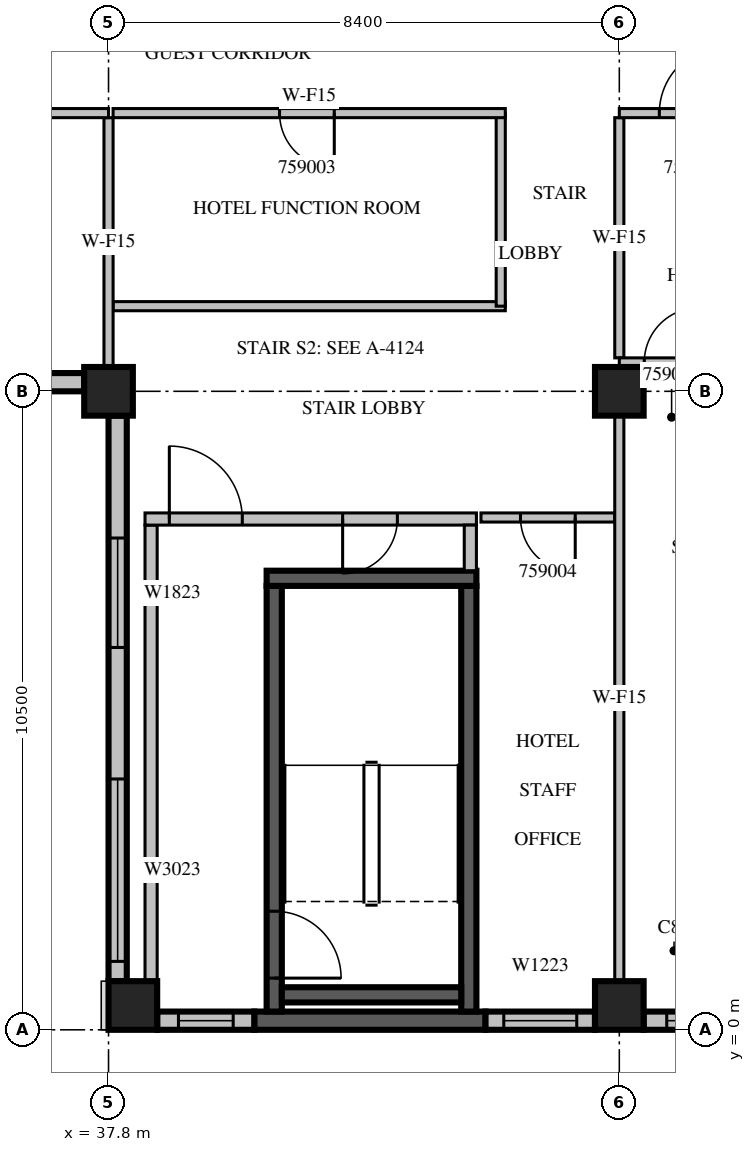
"""IFC4 building model, lengths in metres.
Left out: names, types, materials, properties, quantities, classifications, styles, units other than length and angle.
Written with IfcOpenShell. Run it as: python <this file> out.ifc"""

import sys

from ifc_helpers import new_model, si_unit, direction, frame, frame_2d, origin, origin_2d, place, context, subcontext, project, spatial, rectangle, extrude, source, transform, mapped, element, fill, save


model = new_model("IFC4")
c1 = context("Model", 3, precision=1e-05, world=origin(), true_north=direction((0.0, 1.0)))
c2 = subcontext(c1, "Body", "Model", "MODEL_VIEW")
j1 = project(units=[si_unit("LENGTHUNIT", "METRE"), si_unit("PLANEANGLEUNIT", "RADIAN")], contexts=[c1])
p1 = place(None, origin())
s1 = spatial("IfcSite", under=j1, at=p1, CompositionType="ELEMENT")
p2 = place(p1, origin())
s2 = spatial("IfcBuilding", under=s1, at=p2, CompositionType="ELEMENT")
p3 = place(p2, frame((0.0, 0.0, 257.6)))
s3 = spatial("IfcBuildingStorey", under=s2, at=p3, CompositionType="ELEMENT", Elevation=257.6)
m1 = source(origin(), c2, "Body", "SweptSolid", [
    extrude(rectangle(XDim=0.8, YDim=0.8, at=origin_2d()), origin(), (0.0, 0.0, 1.0), 3.8),
])
for number, where, z_axis, x_axis in (
    (1, (38.2, 0.4, 0.0), (0.0, 0.0, 1.0), (1.0, 0.0, 0.0)),
    (2, (46.2, 0.4, 0.0), (0.0, 0.0, 1.0), (1.0, 0.0, 0.0)),
    (3, (37.8, 10.5, 0.0), (0.0, 0.0, 1.0), (1.0, 0.0, 0.0)),
    (4, (46.2, 10.5, 0.0), (0.0, 0.0, 1.0), (1.0, 0.0, 0.0)),
):
    element("IfcColumn", number, at=place(p3, frame(where, z_axis=z_axis, x_axis=x_axis)), inside=s3, PredefinedType="COLUMN", context=c2, shape_type="MappedRepresentation", body=[
        mapped(m1, transform((0.0, 0.0, 0.0), scale=1.0)),
    ])
m2 = source(origin(), c2, "Body", "SweptSolid", [
    extrude(rectangle(XDim=7.6, YDim=0.3, at=frame_2d((3.8, 0.0))), origin(), (0.0, 0.0, 1.0), 3.4),
])
p4 = place(p3, frame((29.8, 10.65, 0.0), z_axis=(0.0, 0.0, 1.0), x_axis=(1.0, 0.0, 0.0)))
e5 = element("IfcWall", 5, at=p4, inside=s3, PredefinedType="STANDARD", context=c2, shape_type="MappedRepresentation", body=[
    mapped(m2, transform((0.0, 0.0, 0.0), scale=1.0)),
])
m3 = source(origin(), c2, "Body", "SweptSolid", [
    extrude(rectangle(XDim=3.0, YDim=2.3, at=frame_2d((1.5, 1.15))), frame((0.0, 0.16, 0.0), z_axis=(0.0, -1.0, 0.0), x_axis=(1.0, 0.0, 0.0)), (0.0, 0.0, 1.0), 0.32),
])
p5 = place(p4, frame((0.2, 0.0, 0.6)))
e6 = element("IfcOpeningElement", 6, at=p5, cuts=e5, PredefinedType="OPENING", context=c2, shape_type="MappedRepresentation", body=[
    mapped(m3, transform((0.0, 0.0, 0.0), scale=1.0)),
])
m4 = source(origin(), c2, "Body", "SweptSolid", [
    extrude(rectangle(XDim=9.3, YDim=0.3, at=frame_2d((4.65, 0.0))), origin(), (0.0, 0.0, 1.0), 3.4),
])
p6 = place(p3, frame((37.95, 10.1, 0.0), z_axis=(0.0, 0.0, 1.0), x_axis=(0.0, -1.0, 0.0)))
e7 = element("IfcWall", 7, at=p6, inside=s3, PredefinedType="STANDARD", context=c2, shape_type="MappedRepresentation", body=[
    mapped(m4, transform((0.0, 0.0, 0.0), scale=1.0)),
])
m5 = source(origin(), c2, "Body", "SweptSolid", [
    extrude(rectangle(XDim=1.8, YDim=2.3, at=frame_2d((0.9, 1.15))), frame((0.0, 0.16, 0.0), z_axis=(0.0, -1.0, 0.0), x_axis=(1.0, 0.0, 0.0)), (0.0, 0.0, 1.0), 0.32),
])
p7 = place(p6, frame((2.013, 0.0, 0.6)))
e8 = element("IfcOpeningElement", 8, at=p7, cuts=e7, PredefinedType="OPENING", context=c2, shape_type="MappedRepresentation", body=[
    mapped(m5, transform((0.0, 0.0, 0.0), scale=1.0)),
])
p8 = place(p6, frame((5.975, 0.0, 0.6)))
e9 = element("IfcOpeningElement", 9, at=p8, cuts=e7, PredefinedType="OPENING", context=c2, shape_type="MappedRepresentation", body=[
    mapped(m3, transform((0.0, 0.0, 0.0), scale=1.0)),
])
m6 = source(origin(), c2, "Body", "SweptSolid", [
    extrude(rectangle(XDim=1.6, YDim=0.3, at=frame_2d((0.8, 0.0))), origin(), (0.0, 0.0, 1.0), 3.4),
])
p9 = place(p3, frame((38.6, 0.15, 0.0), z_axis=(0.0, 0.0, 1.0), x_axis=(1.0, 0.0, 0.0)))
e10 = element("IfcWall", 10, at=p9, inside=s3, PredefinedType="STANDARD", context=c2, shape_type="MappedRepresentation", body=[
    mapped(m6, transform((0.0, 0.0, 0.0), scale=1.0)),
])
m7 = source(origin(), c2, "Body", "SweptSolid", [
    extrude(rectangle(XDim=0.9, YDim=2.3, at=frame_2d((0.45, 1.15))), frame((0.0, 0.16, 0.0), z_axis=(0.0, -1.0, 0.0), x_axis=(1.0, 0.0, 0.0)), (0.0, 0.0, 1.0), 0.32),
])
p10 = place(p9, frame((0.35, 0.0, 0.6)))
e11 = element("IfcOpeningElement", 11, at=p10, cuts=e10, PredefinedType="OPENING", context=c2, shape_type="MappedRepresentation", body=[
    mapped(m7, transform((0.0, 0.0, 0.0), scale=1.0)),
])
m8 = source(origin(), c2, "Body", "SweptSolid", [
    extrude(rectangle(XDim=3.8, YDim=0.3, at=frame_2d((1.9, 0.0))), origin(), (0.0, 0.0, 1.0), 3.4),
])
p11 = place(p3, frame((40.2, 0.15, 0.0), z_axis=(0.0, 0.0, 1.0), x_axis=(1.0, 0.0, 0.0)))
e12 = element("IfcWall", 12, at=p11, inside=s3, PredefinedType="SOLIDWALL", context=c2, shape_type="MappedRepresentation", body=[
    mapped(m8, transform((0.0, 0.0, 0.0), scale=1.0)),
])
m9 = source(origin(), c2, "Body", "SweptSolid", [
    extrude(rectangle(XDim=1.8, YDim=0.3, at=frame_2d((0.9, 0.0))), origin(), (0.0, 0.0, 1.0), 3.4),
])
p12 = place(p3, frame((44.0, 0.15, 0.0), z_axis=(0.0, 0.0, 1.0), x_axis=(1.0, 0.0, 0.0)))
e13 = element("IfcWall", 13, at=p12, inside=s3, PredefinedType="STANDARD", context=c2, shape_type="MappedRepresentation", body=[
    mapped(m9, transform((0.0, 0.0, 0.0), scale=1.0)),
])
m10 = source(origin(), c2, "Body", "SweptSolid", [
    extrude(rectangle(XDim=1.2, YDim=2.3, at=frame_2d((0.6, 1.15))), frame((0.0, 0.16, 0.0), z_axis=(0.0, -1.0, 0.0), x_axis=(1.0, 0.0, 0.0)), (0.0, 0.0, 1.0), 0.32),
])
p13 = place(p12, frame((0.3, 0.0, 0.6)))
e14 = element("IfcOpeningElement", 14, at=p13, cuts=e13, PredefinedType="OPENING", context=c2, shape_type="MappedRepresentation", body=[
    mapped(m10, transform((0.0, 0.0, 0.0), scale=1.0)),
])
m11 = source(origin(), c2, "Body", "SweptSolid", [
    extrude(rectangle(XDim=2.96, YDim=0.3, at=frame_2d((1.48, 0.0))), origin(), (0.0, 0.0, 1.0), 3.4),
])
p14 = place(p3, frame((46.6, 0.15, 0.0), z_axis=(0.0, 0.0, 1.0), x_axis=(1.0, 0.0, 0.0)))
e15 = element("IfcWall", 15, at=p14, inside=s3, PredefinedType="STANDARD", context=c2, shape_type="MappedRepresentation", body=[
    mapped(m11, transform((0.0, 0.0, 0.0), scale=1.0)),
])
p15 = place(p14, frame((0.38, 0.0, 0.6)))
e16 = element("IfcOpeningElement", 16, at=p15, cuts=e15, PredefinedType="OPENING", context=c2, shape_type="MappedRepresentation", body=[
    mapped(m5, transform((0.0, 0.0, 0.0), scale=1.0)),
])
m12 = source(origin(), c2, "Body", "SweptSolid", [
    extrude(rectangle(XDim=7.0, YDim=0.25, at=frame_2d((3.5, 0.0))), origin(), (0.0, 0.0, 1.0), 3.4),
])
p16 = place(p3, frame((40.525, 0.3, 0.0), z_axis=(0.0, 0.0, 1.0), x_axis=(0.0, 1.0, 0.0)))
e17 = element("IfcWall", 17, at=p16, inside=s3, PredefinedType="SOLIDWALL", context=c2, shape_type="MappedRepresentation", body=[
    mapped(m12, transform((0.0, 0.0, 0.0), scale=1.0)),
])
m13 = source(origin(), c2, "Body", "SweptSolid", [
    extrude(rectangle(XDim=1.1, YDim=2.1, at=frame_2d((0.55, 1.05))), frame((0.0, 0.135, 0.0), z_axis=(0.0, -1.0, 0.0), x_axis=(1.0, 0.0, 0.0)), (0.0, 0.0, 1.0), 0.27),
])
p17 = place(p16, frame((0.55, 0.0, 0.0)))
e18 = element("IfcOpeningElement", 18, at=p17, cuts=e17, PredefinedType="OPENING", context=c2, shape_type="MappedRepresentation", body=[
    mapped(m13, transform((0.0, 0.0, 0.0), scale=1.0)),
])
p18 = place(p3, frame((43.725, 0.3, 0.0), z_axis=(0.0, 0.0, 1.0), x_axis=(0.0, 1.0, 0.0)))
e19 = element("IfcWall", 19, at=p18, inside=s3, PredefinedType="SOLIDWALL", context=c2, shape_type="MappedRepresentation", body=[
    mapped(m12, transform((0.0, 0.0, 0.0), scale=1.0)),
])
m14 = source(origin(), c2, "Body", "SweptSolid", [
    extrude(rectangle(XDim=3.45, YDim=0.25, at=frame_2d((1.725, 0.0))), origin(), (0.0, 0.0, 1.0), 3.4),
])
p19 = place(p3, frame((40.4, 7.425, 0.0), z_axis=(0.0, 0.0, 1.0), x_axis=(1.0, 0.0, 0.0)))
e20 = element("IfcWall", 20, at=p19, inside=s3, PredefinedType="SOLIDWALL", context=c2, shape_type="MappedRepresentation", body=[
    mapped(m14, transform((0.0, 0.0, 0.0), scale=1.0)),
])
m15 = source(origin(), c2, "Body", "SweptSolid", [
    extrude(rectangle(XDim=2.95, YDim=0.25, at=frame_2d((1.475, 0.0))), origin(), (0.0, 0.0, 1.0), 3.4),
])
p20 = place(p3, frame((40.65, 0.575, 0.0), z_axis=(0.0, 0.0, 1.0), x_axis=(1.0, 0.0, 0.0)))
e21 = element("IfcWall", 21, at=p20, inside=s3, PredefinedType="SOLIDWALL", context=c2, shape_type="MappedRepresentation", body=[
    mapped(m15, transform((0.0, 0.0, 0.0), scale=1.0)),
])
m16 = source(origin(), c2, "Body", "SweptSolid", [
    extrude(rectangle(XDim=8.0, YDim=0.2, at=frame_2d((4.0, 0.0))), origin(), (0.0, 0.0, 1.0), 3.4),
])
p21 = place(p3, frame((38.5, 0.3, 0.0), z_axis=(0.0, 0.0, 1.0), x_axis=(0.0, 1.0, 0.0)))
e22 = element("IfcWall", 22, at=p21, inside=s3, PredefinedType="PARTITIONING", context=c2, shape_type="MappedRepresentation", body=[
    mapped(m16, transform((0.0, 0.0, 0.0), scale=1.0)),
])
m17 = source(origin(), c2, "Body", "SweptSolid", [
    extrude(rectangle(XDim=5.45, YDim=0.2, at=frame_2d((2.725, 0.0))), origin(), (0.0, 0.0, 1.0), 3.4),
])
p22 = place(p3, frame((38.4, 8.4, 0.0), z_axis=(0.0, 0.0, 1.0), x_axis=(1.0, 0.0, 0.0)))
e23 = element("IfcWall", 23, at=p22, inside=s3, PredefinedType="PARTITIONING", context=c2, shape_type="MappedRepresentation", body=[
    mapped(m17, transform((0.0, 0.0, 0.0), scale=1.0)),
])
m18 = source(origin(), c2, "Body", "SweptSolid", [
    extrude(rectangle(XDim=1.2, YDim=2.1, at=frame_2d((0.6, 1.05))), frame((0.0, 0.11, 0.0), z_axis=(0.0, -1.0, 0.0), x_axis=(1.0, 0.0, 0.0)), (0.0, 0.0, 1.0), 0.22),
])
p23 = place(p22, frame((0.4, 0.0, 0.0)))
e24 = element("IfcOpeningElement", 24, at=p23, cuts=e23, PredefinedType="OPENING", context=c2, shape_type="MappedRepresentation", body=[
    mapped(m18, transform((0.0, 0.0, 0.0), scale=1.0)),
])
m19 = source(origin(), c2, "Body", "SweptSolid", [
    extrude(rectangle(XDim=0.9, YDim=2.1, at=frame_2d((0.45, 1.05))), frame((0.0, 0.11, 0.0), z_axis=(0.0, -1.0, 0.0), x_axis=(1.0, 0.0, 0.0)), (0.0, 0.0, 1.0), 0.22),
])
p24 = place(p22, frame((3.25, 0.0, 0.0)))
e25 = element("IfcOpeningElement", 25, at=p24, cuts=e23, PredefinedType="OPENING", context=c2, shape_type="MappedRepresentation", body=[
    mapped(m19, transform((0.0, 0.0, 0.0), scale=1.0)),
])
m20 = source(origin(), c2, "Body", "SweptSolid", [
    extrude(rectangle(XDim=0.75, YDim=0.2, at=frame_2d((0.375, 0.0))), origin(), (0.0, 0.0, 1.0), 3.4),
])
p25 = place(p3, frame((43.75, 7.55, 0.0), z_axis=(0.0, 0.0, 1.0), x_axis=(0.0, 1.0, 0.0)))
e26 = element("IfcWall", 26, at=p25, inside=s3, PredefinedType="PARTITIONING", context=c2, shape_type="MappedRepresentation", body=[
    mapped(m20, transform((0.0, 0.0, 0.0), scale=1.0)),
])
m21 = source(origin(), c2, "Body", "SweptSolid", [
    extrude(rectangle(XDim=6.45, YDim=0.15, at=frame_2d((3.225, 0.0))), origin(), (0.0, 0.0, 1.0), 3.4),
])
p26 = place(p3, frame((37.875, 11.9, 0.0), z_axis=(0.0, 0.0, 1.0), x_axis=(1.0, 0.0, 0.0)))
e27 = element("IfcWall", 27, at=p26, inside=s3, PredefinedType="PARTITIONING", context=c2, shape_type="MappedRepresentation", body=[
    mapped(m21, transform((0.0, 0.0, 0.0), scale=1.0)),
])
m22 = source(origin(), c2, "Body", "SweptSolid", [
    extrude(rectangle(XDim=3.175, YDim=0.15, at=frame_2d((1.587, 0.0))), origin(), (0.0, 0.0, 1.0), 3.4),
])
p27 = place(p3, frame((44.25, 11.9, 0.0), z_axis=(0.0, 0.0, 1.0), x_axis=(0.0, 1.0, 0.0)))
e28 = element("IfcWall", 28, at=p27, inside=s3, PredefinedType="PARTITIONING", context=c2, shape_type="MappedRepresentation", body=[
    mapped(m22, transform((0.0, 0.0, 0.0), scale=1.0)),
])
p28 = place(p3, frame((44.325, 15.075, 0.0), z_axis=(0.0, 0.0, 1.0), x_axis=(-1.0, 0.0, 0.0)))
e29 = element("IfcWall", 29, at=p28, inside=s3, PredefinedType="PARTITIONING", context=c2, shape_type="MappedRepresentation", body=[
    mapped(m21, transform((0.0, 0.0, 0.0), scale=1.0)),
])
m23 = source(origin(), c2, "Body", "SweptSolid", [
    extrude(rectangle(XDim=0.9, YDim=2.1, at=frame_2d((0.45, 1.05))), frame((0.0, 0.085, 0.0), z_axis=(0.0, -1.0, 0.0), x_axis=(1.0, 0.0, 0.0)), (0.0, 0.0, 1.0), 0.17),
])
p29 = place(p28, frame((2.812, 0.0, 0.0)))
e30 = element("IfcOpeningElement", 30, at=p29, cuts=e29, PredefinedType="OPENING", context=c2, shape_type="MappedRepresentation", body=[
    mapped(m23, transform((0.0, 0.0, 0.0), scale=1.0)),
])
m24 = source(origin(), c2, "Body", "SweptSolid", [
    extrude(rectangle(XDim=2.2, YDim=0.15, at=frame_2d((1.1, 0.0))), origin(), (0.0, 0.0, 1.0), 3.4),
])
p30 = place(p3, frame((46.125, 8.425, 0.0), z_axis=(0.0, 0.0, 1.0), x_axis=(-1.0, 0.0, 0.0)))
e31 = element("IfcWall", 31, at=p30, inside=s3, PredefinedType="PARTITIONING", context=c2, shape_type="MappedRepresentation", body=[
    mapped(m24, transform((0.0, 0.0, 0.0), scale=1.0)),
])
p31 = place(p30, frame((0.65, 0.0, 0.0)))
e32 = element("IfcOpeningElement", 32, at=p31, cuts=e31, PredefinedType="OPENING", context=c2, shape_type="MappedRepresentation", body=[
    mapped(m23, transform((0.0, 0.0, 0.0), scale=1.0)),
])
m25 = source(origin(), c2, "Body", "SweptSolid", [
    extrude(rectangle(XDim=4.101, YDim=0.15, at=frame_2d((2.05, 0.0))), origin(), (0.0, 0.0, 1.0), 3.4),
])
p32 = place(p3, frame((37.8, 10.899, 0.0), z_axis=(0.0, 0.0, 1.0), x_axis=(0.0, 1.0, 0.0)))
e33 = element("IfcWall", 33, at=p32, inside=s3, PredefinedType="PARTITIONING", context=c2, shape_type="MappedRepresentation", body=[
    mapped(m25, transform((0.0, 0.0, 0.0), scale=1.0)),
])
m26 = source(origin(), c2, "Body", "SweptSolid", [
    extrude(rectangle(XDim=9.302, YDim=0.15, at=frame_2d((4.651, 0.0))), origin(), (0.0, 0.0, 1.0), 3.4),
])
p33 = place(p3, frame((46.2, 0.799, 0.0), z_axis=(0.0, 0.0, 1.0), x_axis=(0.0, 1.0, 0.0)))
e34 = element("IfcWall", 34, at=p33, inside=s3, PredefinedType="PARTITIONING", context=c2, shape_type="MappedRepresentation", body=[
    mapped(m26, transform((0.0, 0.0, 0.0), scale=1.0)),
])
m27 = source(origin(), c2, "Body", "SweptSolid", [
    extrude(rectangle(XDim=3.95, YDim=0.15, at=frame_2d((1.975, 0.0))), origin(), (0.0, 0.0, 1.0), 3.4),
])
p34 = place(p3, frame((46.2, 11.05, 0.0), z_axis=(0.0, 0.0, 1.0), x_axis=(0.0, 1.0, 0.0)))
e35 = element("IfcWall", 35, at=p34, inside=s3, PredefinedType="PARTITIONING", context=c2, shape_type="MappedRepresentation", body=[
    mapped(m27, transform((0.0, 0.0, 0.0), scale=1.0)),
])
m28 = source(origin(), c2, "Body", "SweptSolid", [
    extrude(rectangle(XDim=7.26, YDim=0.15, at=frame_2d((3.63, 0.0))), origin(), (0.0, 0.0, 1.0), 3.4),
])
p35 = place(p3, frame((53.46, 10.975, 0.0), z_axis=(0.0, 0.0, 1.0), x_axis=(-1.0, 0.0, 0.0)))
e36 = element("IfcWall", 36, at=p35, inside=s3, PredefinedType="PARTITIONING", context=c2, shape_type="MappedRepresentation", body=[
    mapped(m28, transform((0.0, 0.0, 0.0), scale=1.0)),
])
p36 = place(p35, frame((4.999, 0.0, 0.0)))
e37 = element("IfcOpeningElement", 37, at=p36, cuts=e36, PredefinedType="OPENING", context=c2, shape_type="MappedRepresentation", body=[
    mapped(m23, transform((0.0, 0.0, 0.0), scale=1.0)),
])
p37 = place(p35, frame((5.95, 0.0, 0.0)))
e38 = element("IfcOpeningElement", 38, at=p37, cuts=e36, PredefinedType="OPENING", context=c2, shape_type="MappedRepresentation", body=[
    mapped(m23, transform((0.0, 0.0, 0.0), scale=1.0)),
])
p38 = place(p35, frame((2.264, 0.0, 0.0)))
e39 = element("IfcOpeningElement", 39, at=p38, cuts=e36, PredefinedType="OPENING", context=c2, shape_type="MappedRepresentation", body=[
    mapped(m23, transform((0.0, 0.0, 0.0), scale=1.0)),
])
m29 = source(origin(), c2, "Body", "SweptSolid", [
    extrude(rectangle(XDim=8.4, YDim=0.15, at=frame_2d((4.2, 0.0))), origin(), (0.0, 0.0, 1.0), 3.4),
])
p39 = place(p3, frame((37.8, 15.075, 0.0), z_axis=(0.0, 0.0, 1.0), x_axis=(-1.0, 0.0, 0.0)))
e40 = element("IfcWall", 40, at=p39, inside=s3, PredefinedType="PARTITIONING", context=c2, shape_type="MappedRepresentation", body=[
    mapped(m29, transform((0.0, 0.0, 0.0), scale=1.0)),
])
m30 = source(origin(), c2, "Body", "SweptSolid", [
    extrude(rectangle(XDim=1.6, YDim=2.1, at=frame_2d((0.8, 1.05))), frame((0.0, 0.085, 0.0), z_axis=(0.0, -1.0, 0.0), x_axis=(1.0, 0.0, 0.0)), (0.0, 0.0, 1.0), 0.17),
])
p40 = place(p39, frame((5.589, 0.0, 0.0)))
e41 = element("IfcOpeningElement", 41, at=p40, cuts=e40, PredefinedType="OPENING", context=c2, shape_type="MappedRepresentation", body=[
    mapped(m30, transform((0.0, 0.0, 0.0), scale=1.0)),
])
p41 = place(p39, frame((2.822, 0.0, 0.0)))
e42 = element("IfcOpeningElement", 42, at=p41, cuts=e40, PredefinedType="OPENING", context=c2, shape_type="MappedRepresentation", body=[
    mapped(m23, transform((0.0, 0.0, 0.0), scale=1.0)),
])
p42 = place(p3, frame((53.46, 15.075, 0.0), z_axis=(0.0, 0.0, 1.0), x_axis=(-1.0, 0.0, 0.0)))
e43 = element("IfcWall", 43, at=p42, inside=s3, PredefinedType="PARTITIONING", context=c2, shape_type="MappedRepresentation", body=[
    mapped(m28, transform((0.0, 0.0, 0.0), scale=1.0)),
])
m31 = source(origin(), c2, "Body", "SweptSolid", [
    extrude(rectangle(XDim=1.1, YDim=2.1, at=frame_2d((0.55, 1.05))), frame((0.0, 0.085, 0.0), z_axis=(0.0, -1.0, 0.0), x_axis=(1.0, 0.0, 0.0)), (0.0, 0.0, 1.0), 0.17),
])
p43 = place(p42, frame((5.502, 0.0, 0.0)))
e44 = element("IfcOpeningElement", 44, at=p43, cuts=e43, PredefinedType="OPENING", context=c2, shape_type="MappedRepresentation", body=[
    mapped(m31, transform((0.0, 0.0, 0.0), scale=1.0)),
])
p44 = place(p42, frame((0.536, 0.0, 0.0)))
e45 = element("IfcOpeningElement", 45, at=p44, cuts=e43, PredefinedType="OPENING", context=c2, shape_type="MappedRepresentation", body=[
    mapped(m23, transform((0.0, 0.0, 0.0), scale=1.0)),
])
m32 = source(origin(), c2, "Body", "SweptSolid", [
    extrude(rectangle(XDim=1.8, YDim=2.3, at=frame_2d((0.9, 1.15))), frame((0.0, 0.03, 0.0), z_axis=(0.0, -1.0, 0.0), x_axis=(1.0, 0.0, 0.0)), (0.0, 0.0, 1.0), 0.06),
])
p45 = place(p7, origin())
e46 = element("IfcWindow", 46, at=p45, inside=s3, PartitioningType="SINGLE_PANEL", PredefinedType="WINDOW", context=c2, shape_type="MappedRepresentation", body=[
    mapped(m32, transform((0.0, 0.0, 0.0), scale=1.0)),
])
fill(e8, e46)
m33 = source(origin(), c2, "Body", "SweptSolid", [
    extrude(rectangle(XDim=3.0, YDim=2.3, at=frame_2d((1.5, 1.15))), frame((0.0, 0.03, 0.0), z_axis=(0.0, -1.0, 0.0), x_axis=(1.0, 0.0, 0.0)), (0.0, 0.0, 1.0), 0.06),
])
p46 = place(p8, origin())
e47 = element("IfcWindow", 47, at=p46, inside=s3, PartitioningType="SINGLE_PANEL", PredefinedType="WINDOW", context=c2, shape_type="MappedRepresentation", body=[
    mapped(m33, transform((0.0, 0.0, 0.0), scale=1.0)),
])
fill(e9, e47)
m34 = source(origin(), c2, "Body", "SweptSolid", [
    extrude(rectangle(XDim=0.9, YDim=2.3, at=frame_2d((0.45, 1.15))), frame((0.0, 0.03, 0.0), z_axis=(0.0, -1.0, 0.0), x_axis=(1.0, 0.0, 0.0)), (0.0, 0.0, 1.0), 0.06),
])
p47 = place(p10, origin())
e48 = element("IfcWindow", 48, at=p47, inside=s3, PartitioningType="SINGLE_PANEL", PredefinedType="WINDOW", context=c2, shape_type="MappedRepresentation", body=[
    mapped(m34, transform((0.0, 0.0, 0.0), scale=1.0)),
])
fill(e11, e48)
m35 = source(origin(), c2, "Body", "SweptSolid", [
    extrude(rectangle(XDim=1.2, YDim=2.3, at=frame_2d((0.6, 1.15))), frame((0.0, 0.03, 0.0), z_axis=(0.0, -1.0, 0.0), x_axis=(1.0, 0.0, 0.0)), (0.0, 0.0, 1.0), 0.06),
])
p48 = place(p13, origin())
e49 = element("IfcWindow", 49, at=p48, inside=s3, PartitioningType="SINGLE_PANEL", PredefinedType="WINDOW", context=c2, shape_type="MappedRepresentation", body=[
    mapped(m35, transform((0.0, 0.0, 0.0), scale=1.0)),
])
fill(e14, e49)
p49 = place(p15, origin())
e50 = element("IfcWindow", 50, at=p49, inside=s3, PartitioningType="SINGLE_PANEL", PredefinedType="WINDOW", context=c2, shape_type="MappedRepresentation", body=[
    mapped(m32, transform((0.0, 0.0, 0.0), scale=1.0)),
])
fill(e16, e50)
m36 = source(origin(), c2, "Body", "SweptSolid", [
    extrude(rectangle(XDim=1.1, YDim=2.1, at=frame_2d((0.55, 1.05))), frame((0.0, 0.025, 0.0), z_axis=(0.0, -1.0, 0.0), x_axis=(1.0, 0.0, 0.0)), (0.0, 0.0, 1.0), 0.05),
])
p50 = place(p17, origin())
e51 = element("IfcDoor", 51, at=p50, inside=s3, OperationType="SINGLE_SWING_RIGHT", PredefinedType="DOOR", context=c2, shape_type="MappedRepresentation", body=[
    mapped(m36, transform((0.0, 0.0, 0.0), scale=1.0)),
])
fill(e18, e51)
m37 = source(origin(), c2, "Body", "SweptSolid", [
    extrude(rectangle(XDim=1.2, YDim=2.1, at=frame_2d((0.6, 1.05))), frame((0.0, 0.025, 0.0), z_axis=(0.0, -1.0, 0.0), x_axis=(1.0, 0.0, 0.0)), (0.0, 0.0, 1.0), 0.05),
])
p51 = place(p23, origin())
e52 = element("IfcDoor", 52, at=p51, inside=s3, OperationType="SINGLE_SWING_LEFT", PredefinedType="DOOR", context=c2, shape_type="MappedRepresentation", body=[
    mapped(m37, transform((0.0, 0.0, 0.0), scale=1.0)),
])
fill(e24, e52)
m38 = source(origin(), c2, "Body", "SweptSolid", [
    extrude(rectangle(XDim=0.9, YDim=2.1, at=frame_2d((0.45, 1.05))), frame((0.0, 0.025, 0.0), z_axis=(0.0, -1.0, 0.0), x_axis=(1.0, 0.0, 0.0)), (0.0, 0.0, 1.0), 0.05),
])
p52 = place(p24, origin())
e53 = element("IfcDoor", 53, at=p52, inside=s3, OperationType="SINGLE_SWING_RIGHT", PredefinedType="DOOR", context=c2, shape_type="MappedRepresentation", body=[
    mapped(m38, transform((0.0, 0.0, 0.0), scale=1.0)),
])
fill(e25, e53)
p53 = place(p29, origin())
e54 = element("IfcDoor", 54, at=p53, inside=s3, OperationType="SINGLE_SWING_LEFT", PredefinedType="DOOR", context=c2, shape_type="MappedRepresentation", body=[
    mapped(m38, transform((0.0, 0.0, 0.0), scale=1.0)),
])
fill(e30, e54)
p54 = place(p31, origin())
e55 = element("IfcDoor", 55, at=p54, inside=s3, OperationType="SINGLE_SWING_LEFT", PredefinedType="DOOR", context=c2, shape_type="MappedRepresentation", body=[
    mapped(m38, transform((0.0, 0.0, 0.0), scale=1.0)),
])
fill(e32, e55)
p55 = place(p43, origin())
e56 = element("IfcDoor", 56, at=p55, inside=s3, OperationType="SINGLE_SWING_RIGHT", PredefinedType="DOOR", context=c2, shape_type="MappedRepresentation", body=[
    mapped(m36, transform((0.0, 0.0, 0.0), scale=1.0)),
])
fill(e44, e56)
p56 = place(p37, origin())
e57 = element("IfcDoor", 57, at=p56, inside=s3, OperationType="SINGLE_SWING_RIGHT", PredefinedType="DOOR", context=c2, shape_type="MappedRepresentation", body=[
    mapped(m38, transform((0.0, 0.0, 0.0), scale=1.0)),
])
fill(e38, e57)
save(model, sys.argv[1])
